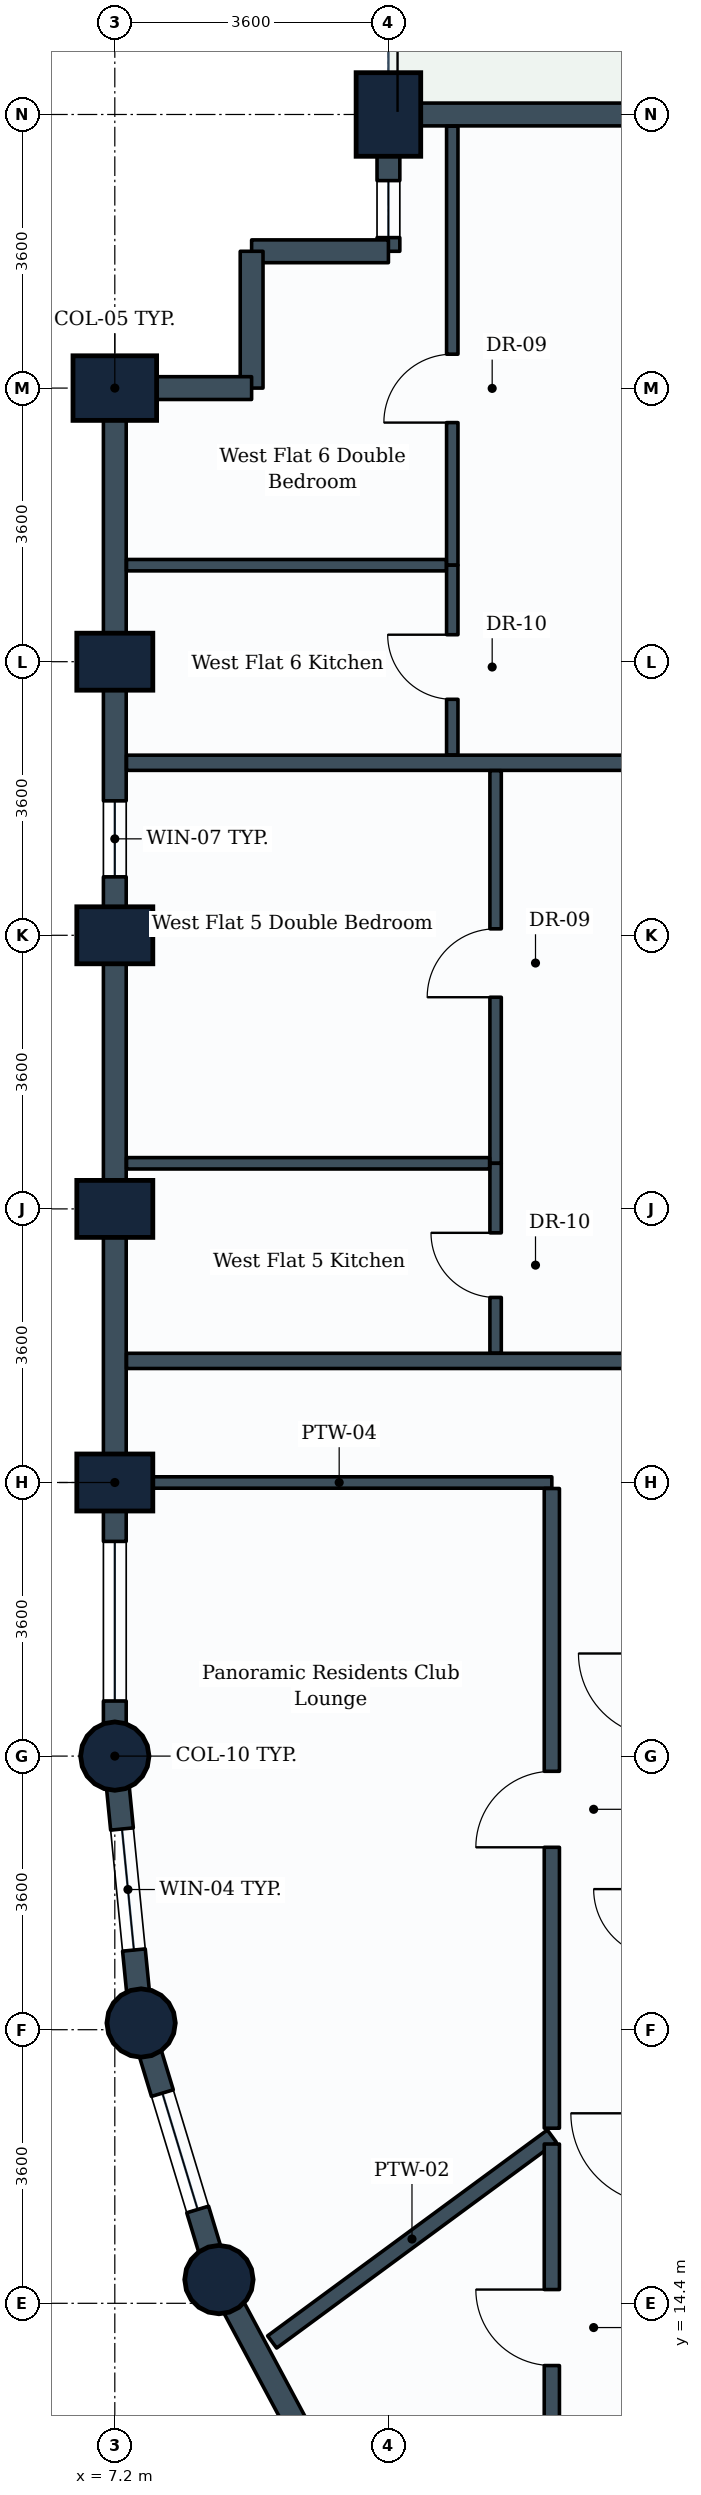
"""IFC4 building model, lengths in metres.
Left out: names, types, materials, properties, quantities, classifications, styles, units other than length and angle.
Written with IfcOpenShell. Run it as: python <this file> out.ifc"""

import sys

from ifc_helpers import new_model, si_unit, direction, frame, frame_2d, origin, origin_2d, place, context, subcontext, project, spatial, rectangle, circle, extrude, element, fill, save


model = new_model("IFC4")
c1 = context("Model", 3, precision=1e-05, world=origin(), true_north=direction((0.0, 1.0)))
c2 = subcontext(c1, "Body", "Model", "MODEL_VIEW")
j1 = project(units=[si_unit("LENGTHUNIT", "METRE"), si_unit("PLANEANGLEUNIT", "RADIAN")], contexts=[c1])
p1 = place(None, origin())
s1 = spatial("IfcSite", under=j1, at=p1, CompositionType="ELEMENT")
p2 = place(p1, origin())
s2 = spatial("IfcBuilding", under=s1, at=p2, CompositionType="ELEMENT")
p3 = place(p2, frame((0.0, 0.0, 131.4)))
s3 = spatial("IfcBuildingStorey", under=s2, at=p3, CompositionType="ELEMENT", Elevation=131.4)
p4 = place(p3, frame((7.2, 21.6, 0.0), z_axis=(0.0, 0.0, 1.0), x_axis=(1.0, 0.0, 0.0)))
e1 = element("IfcColumn", 1, at=p4, inside=s3, PredefinedType="COLUMN", context=c2, shape_type="SweptSolid", body=[
    extrude(circle(Radius=0.45, at=origin_2d()), origin(), (0.0, 0.0, 1.0), 3.8),
])
for number, where, z_axis, x_axis in (
    (2, (7.2, 25.2, 0.0), (0.0, 0.0, 1.0), (0.0, 1.0, 0.0)),
    (3, (7.2, 28.8, 0.0), (0.0, 0.0, 1.0), (0.0, 1.0, 0.0)),
    (4, (7.2, 32.4, 0.0), (0.0, 0.0, 1.0), (0.0, 1.0, 0.0)),
    (5, (7.2, 36.0, 0.0), (0.0, 0.0, 1.0), (0.0, 1.0, 0.0)),
):
    element("IfcColumn", number, at=place(p3, frame(where, z_axis=z_axis, x_axis=x_axis)), inside=s3, PredefinedType="COLUMN", context=c2, shape_type="SweptSolid", body=[
        extrude(rectangle(XDim=0.75, YDim=1.0, at=origin_2d()), origin(), (0.0, 0.0, 1.0), 3.8),
    ])
p5 = place(p3, frame((7.2, 39.6, 0.0), z_axis=(0.0, 0.0, 1.0), x_axis=(0.0, 1.0, 0.0)))
e6 = element("IfcColumn", 6, at=p5, inside=s3, PredefinedType="COLUMN", context=c2, shape_type="SweptSolid", body=[
    extrude(rectangle(XDim=0.85, YDim=1.1, at=origin_2d()), origin(), (0.0, 0.0, 1.0), 3.8),
])
for number, where, z_axis, x_axis in (
    (7, (7.546, 18.088, 0.0), (0.0, 0.0, 1.0), (1.0, 0.0, 0.0)),
    (8, (8.57, 14.712, 0.0), (0.0, 0.0, 1.0), (1.0, 0.0, 0.0)),
):
    element("IfcColumn", number, at=place(p3, frame(where, z_axis=z_axis, x_axis=x_axis)), inside=s3, PredefinedType="COLUMN", context=c2, shape_type="SweptSolid", body=[
        extrude(circle(Radius=0.45, at=origin_2d()), origin(), (0.0, 0.0, 1.0), 3.8),
    ])
p6 = place(p3, frame((10.8, 43.2, 0.0), z_axis=(0.0, 0.0, 1.0), x_axis=(1.0, 0.0, 0.0)))
e9 = element("IfcColumn", 9, at=p6, inside=s3, PredefinedType="COLUMN", context=c2, shape_type="SweptSolid", body=[
    extrude(rectangle(XDim=0.85, YDim=1.1, at=origin_2d()), origin(), (0.0, 0.0, 1.0), 3.8),
])
p7 = place(p3, frame((10.8, 43.2, 0.0), z_axis=(0.0, 0.0, 1.0), x_axis=(1.0, 0.0, 0.0)))
e10 = element("IfcWall", 10, at=p7, inside=s3, PredefinedType="STANDARD", context=c2, shape_type="SweptSolid", body=[
    extrude(rectangle(XDim=3.6, YDim=0.3, at=frame_2d((1.8, 0.0))), origin(), (0.0, 0.0, 1.0), 2.93),
])
p8 = place(p3, frame((10.8, 41.4, 0.0), z_axis=(0.0, 0.0, 1.0), x_axis=(0.0, 1.0, 0.0)))
e11 = element("IfcWall", 11, at=p8, inside=s3, PredefinedType="STANDARD", context=c2, shape_type="SweptSolid", body=[
    extrude(rectangle(XDim=1.8, YDim=0.3, at=frame_2d((0.9, 0.0))), origin(), (0.0, 0.0, 1.0), 2.93),
])
p9 = place(p8, frame((0.18, 0.0, 0.85)))
e12 = element("IfcOpeningElement", 12, at=p9, cuts=e11, PredefinedType="OPENING", context=c2, shape_type="SweptSolid", body=[
    extrude(rectangle(XDim=0.75, YDim=1.05, at=frame_2d((0.375, 0.525))), frame((0.0, 0.16, 0.0), z_axis=(0.0, -1.0, 0.0), x_axis=(1.0, 0.0, 0.0)), (0.0, 0.0, 1.0), 0.32),
])
p10 = place(p3, frame((9.0, 41.4, 0.0), z_axis=(0.0, 0.0, 1.0), x_axis=(1.0, 0.0, 0.0)))
e13 = element("IfcWall", 13, at=p10, inside=s3, PredefinedType="STANDARD", context=c2, shape_type="SweptSolid", body=[
    extrude(rectangle(XDim=1.8, YDim=0.3, at=frame_2d((0.9, 0.0))), origin(), (0.0, 0.0, 1.0), 3.535),
])
p11 = place(p3, frame((9.0, 39.6, 0.0), z_axis=(0.0, 0.0, 1.0), x_axis=(0.0, 1.0, 0.0)))
e14 = element("IfcWall", 14, at=p11, inside=s3, PredefinedType="STANDARD", context=c2, shape_type="SweptSolid", body=[
    extrude(rectangle(XDim=1.8, YDim=0.3, at=frame_2d((0.9, 0.0))), origin(), (0.0, 0.0, 1.0), 3.535),
])
p12 = place(p3, frame((7.2, 39.6, 0.0), z_axis=(0.0, 0.0, 1.0), x_axis=(1.0, 0.0, 0.0)))
e15 = element("IfcWall", 15, at=p12, inside=s3, PredefinedType="STANDARD", context=c2, shape_type="SweptSolid", body=[
    extrude(rectangle(XDim=1.8, YDim=0.3, at=frame_2d((0.9, 0.0))), origin(), (0.0, 0.0, 1.0), 2.93),
])
p13 = place(p3, frame((7.2, 36.0, 0.0), z_axis=(0.0, 0.0, 1.0), x_axis=(0.0, 1.0, 0.0)))
e16 = element("IfcWall", 16, at=p13, inside=s3, PredefinedType="STANDARD", context=c2, shape_type="SweptSolid", body=[
    extrude(rectangle(XDim=3.6, YDim=0.3, at=frame_2d((1.8, 0.0))), origin(), (0.0, 0.0, 1.0), 2.93),
])
p14 = place(p3, frame((7.2, 32.4, 0.0), z_axis=(0.0, 0.0, 1.0), x_axis=(0.0, 1.0, 0.0)))
e17 = element("IfcWall", 17, at=p14, inside=s3, PredefinedType="STANDARD", context=c2, shape_type="SweptSolid", body=[
    extrude(rectangle(XDim=3.6, YDim=0.3, at=frame_2d((1.8, 0.0))), origin(), (0.0, 0.0, 1.0), 2.93),
])
p15 = place(p14, frame((0.769, 0.0, 0.85)))
e18 = element("IfcOpeningElement", 18, at=p15, cuts=e17, PredefinedType="OPENING", context=c2, shape_type="SweptSolid", body=[
    extrude(rectangle(XDim=1.0, YDim=1.35, at=frame_2d((0.5, 0.675))), frame((0.0, 0.16, 0.0), z_axis=(0.0, -1.0, 0.0), x_axis=(1.0, 0.0, 0.0)), (0.0, 0.0, 1.0), 0.32),
])
p16 = place(p3, frame((7.2, 28.8, 0.0), z_axis=(0.0, 0.0, 1.0), x_axis=(0.0, 1.0, 0.0)))
e19 = element("IfcWall", 19, at=p16, inside=s3, PredefinedType="STANDARD", context=c2, shape_type="SweptSolid", body=[
    extrude(rectangle(XDim=3.6, YDim=0.3, at=frame_2d((1.8, 0.0))), origin(), (0.0, 0.0, 1.0), 2.93),
])
p17 = place(p3, frame((7.2, 25.2, 0.0), z_axis=(0.0, 0.0, 1.0), x_axis=(0.0, 1.0, 0.0)))
e20 = element("IfcWall", 20, at=p17, inside=s3, PredefinedType="STANDARD", context=c2, shape_type="SweptSolid", body=[
    extrude(rectangle(XDim=3.6, YDim=0.3, at=frame_2d((1.8, 0.0))), origin(), (0.0, 0.0, 1.0), 2.93),
])
p18 = place(p3, frame((7.2, 21.6, 0.0), z_axis=(0.0, 0.0, 1.0), x_axis=(0.0, 1.0, 0.0)))
e21 = element("IfcWall", 21, at=p18, inside=s3, PredefinedType="STANDARD", context=c2, shape_type="SweptSolid", body=[
    extrude(rectangle(XDim=3.6, YDim=0.3, at=frame_2d((1.8, 0.0))), origin(), (0.0, 0.0, 1.0), 2.93),
])
p19 = place(p18, frame((0.725, 0.0, 0.85)))
e22 = element("IfcOpeningElement", 22, at=p19, cuts=e21, PredefinedType="OPENING", context=c2, shape_type="SweptSolid", body=[
    extrude(rectangle(XDim=2.1, YDim=1.35, at=frame_2d((1.05, 0.675))), frame((0.0, 0.16, 0.0), z_axis=(0.0, -1.0, 0.0), x_axis=(1.0, 0.0, 0.0)), (0.0, 0.0, 1.0), 0.32),
])
p20 = place(p3, frame((7.546, 18.088, 0.0), z_axis=(0.0, 0.0, 1.0), x_axis=(-0.09802417461, 0.995184033831, 0.0)))
e23 = element("IfcWall", 23, at=p20, inside=s3, PredefinedType="STANDARD", context=c2, shape_type="SweptSolid", body=[
    extrude(rectangle(XDim=3.529, YDim=0.3, at=frame_2d((1.765, 0.0))), origin(), (0.0, 0.0, 1.0), 2.93),
])
p21 = place(p20, frame((0.965, 0.0, 0.85)))
e24 = element("IfcOpeningElement", 24, at=p21, cuts=e23, PredefinedType="OPENING", context=c2, shape_type="SweptSolid", body=[
    extrude(rectangle(XDim=1.6, YDim=1.35, at=frame_2d((0.8, 0.675))), frame((0.0, 0.16, 0.0), z_axis=(0.0, -1.0, 0.0), x_axis=(1.0, 0.0, 0.0)), (0.0, 0.0, 1.0), 0.32),
])
p22 = place(p3, frame((8.57, 14.712, 0.0), z_axis=(0.0, 0.0, 1.0), x_axis=(-0.290305086481, 0.956934144423, 0.0)))
e25 = element("IfcWall", 25, at=p22, inside=s3, PredefinedType="STANDARD", context=c2, shape_type="SweptSolid", body=[
    extrude(rectangle(XDim=3.528, YDim=0.3, at=frame_2d((1.764, 0.0))), origin(), (0.0, 0.0, 1.0), 2.93),
])
p23 = place(p22, frame((0.964, 0.0, 0.85)))
e26 = element("IfcOpeningElement", 26, at=p23, cuts=e25, PredefinedType="OPENING", context=c2, shape_type="SweptSolid", body=[
    extrude(rectangle(XDim=1.6, YDim=1.35, at=frame_2d((0.8, 0.675))), frame((0.0, 0.16, 0.0), z_axis=(0.0, -1.0, 0.0), x_axis=(1.0, 0.0, 0.0)), (0.0, 0.0, 1.0), 0.32),
])
p24 = place(p3, frame((10.234, 11.6, 0.0), z_axis=(0.0, 0.0, 1.0), x_axis=(-0.47151087309, 0.881860247748, 0.0)))
e27 = element("IfcWall", 27, at=p24, inside=s3, PredefinedType="STANDARD", context=c2, shape_type="SweptSolid", body=[
    extrude(rectangle(XDim=3.529, YDim=0.3, at=frame_2d((1.764, 0.0))), origin(), (0.0, 0.0, 1.0), 2.93),
])
p25 = place(p3, frame((7.354, 25.2, 0.0), z_axis=(0.0, 0.0, 1.0), x_axis=(1.0, 0.0, 0.0)))
e28 = element("IfcWall", 28, at=p25, inside=s3, PredefinedType="PARTITIONING", context=c2, shape_type="SweptSolid", body=[
    extrude(rectangle(XDim=5.596, YDim=0.15, at=frame_2d((2.798, 0.0))), origin(), (0.0, 0.0, 1.0), 3.535),
])
p26 = place(p3, frame((12.95, 16.6, 0.0), z_axis=(0.0, 0.0, 1.0), x_axis=(-0.805365932827, -0.592777963694, 0.0)))
e29 = element("IfcWall", 29, at=p26, inside=s3, PredefinedType="PARTITIONING", context=c2, shape_type="SweptSolid", body=[
    extrude(rectangle(XDim=4.57, YDim=0.2, at=frame_2d((2.285, 0.0))), origin(), (0.0, 0.0, 1.0), 2.93),
])
p27 = place(p3, frame((12.95, 16.704, 0.0), z_axis=(0.0, 0.0, 1.0), x_axis=(0.0, 1.0, 0.0)))
e30 = element("IfcWall", 30, at=p27, inside=s3, PredefinedType="PARTITIONING", context=c2, shape_type="SweptSolid", body=[
    extrude(rectangle(XDim=8.417, YDim=0.2, at=frame_2d((4.208, 0.0))), origin(), (0.0, 0.0, 1.0), 3.18),
])
p28 = place(p27, frame((3.696, 0.0, 0.0)))
e31 = element("IfcOpeningElement", 31, at=p28, cuts=e30, PredefinedType="OPENING", context=c2, shape_type="SweptSolid", body=[
    extrude(rectangle(XDim=1.0, YDim=2.1, at=frame_2d((0.5, 1.05))), frame((0.0, 0.11, 0.0), z_axis=(0.0, -1.0, 0.0), x_axis=(1.0, 0.0, 0.0)), (0.0, 0.0, 1.0), 0.22),
])
p29 = place(p3, frame((12.95, 9.619, 0.0), z_axis=(0.0, 0.0, 1.0), x_axis=(0.0, 1.0, 0.0)))
e32 = element("IfcWall", 32, at=p29, inside=s3, PredefinedType="PARTITIONING", context=c2, shape_type="SweptSolid", body=[
    extrude(rectangle(XDim=6.877, YDim=0.2, at=frame_2d((3.438, 0.0))), origin(), (0.0, 0.0, 1.0), 3.17),
])
p30 = place(p29, frame((3.962, 0.0, 0.0)))
e33 = element("IfcOpeningElement", 33, at=p30, cuts=e32, PredefinedType="OPENING", context=c2, shape_type="SweptSolid", body=[
    extrude(rectangle(XDim=1.0, YDim=2.1, at=frame_2d((0.5, 1.05))), frame((0.0, 0.11, 0.0), z_axis=(0.0, -1.0, 0.0), x_axis=(1.0, 0.0, 0.0)), (0.0, 0.0, 1.0), 0.22),
])
for number, where, z_axis, x_axis in (
    (34, (7.354, 26.8, 0.0), (0.0, 0.0, 1.0), (1.0, 0.0, 0.0)),
    (35, (7.354, 34.67, 0.0), (0.0, 0.0, 1.0), (1.0, 0.0, 0.0)),
):
    element("IfcWall", number, at=place(p3, frame(where, z_axis=z_axis, x_axis=x_axis)), inside=s3, PredefinedType="PARTITIONING", context=c2, shape_type="SweptSolid", body=[
        extrude(rectangle(XDim=14.046, YDim=0.2, at=frame_2d((7.023, 0.0))), origin(), (0.0, 0.0, 1.0), 2.93),
    ])
p31 = place(p3, frame((12.21, 29.4, 0.0), z_axis=(0.0, 0.0, 1.0), x_axis=(0.0, 1.0, 0.0)))
e36 = element("IfcWall", 36, at=p31, inside=s3, PredefinedType="PARTITIONING", context=c2, shape_type="SweptSolid", body=[
    extrude(rectangle(XDim=5.166, YDim=0.15, at=frame_2d((2.583, 0.0))), origin(), (0.0, 0.0, 1.0), 3.18),
])
p32 = place(p31, frame((2.185, 0.0, 0.0)))
e37 = element("IfcOpeningElement", 37, at=p32, cuts=e36, PredefinedType="OPENING", context=c2, shape_type="SweptSolid", body=[
    extrude(rectangle(XDim=0.9, YDim=2.1, at=frame_2d((0.45, 1.05))), frame((0.0, 0.085, 0.0), z_axis=(0.0, -1.0, 0.0), x_axis=(1.0, 0.0, 0.0)), (0.0, 0.0, 1.0), 0.17),
])
p33 = place(p3, frame((12.21, 26.904, 0.0), z_axis=(0.0, 0.0, 1.0), x_axis=(0.0, 1.0, 0.0)))
e38 = element("IfcWall", 38, at=p33, inside=s3, PredefinedType="PARTITIONING", context=c2, shape_type="SweptSolid", body=[
    extrude(rectangle(XDim=2.496, YDim=0.15, at=frame_2d((1.248, 0.0))), origin(), (0.0, 0.0, 1.0), 3.17),
])
p34 = place(p33, frame((0.731, 0.0, 0.0)))
e39 = element("IfcOpeningElement", 39, at=p34, cuts=e38, PredefinedType="OPENING", context=c2, shape_type="SweptSolid", body=[
    extrude(rectangle(XDim=0.85, YDim=2.1, at=frame_2d((0.425, 1.05))), frame((0.0, 0.085, 0.0), z_axis=(0.0, -1.0, 0.0), x_axis=(1.0, 0.0, 0.0)), (0.0, 0.0, 1.0), 0.17),
])
p35 = place(p3, frame((7.354, 29.4, 0.0), z_axis=(0.0, 0.0, 1.0), x_axis=(1.0, 0.0, 0.0)))
e40 = element("IfcWall", 40, at=p35, inside=s3, PredefinedType="PARTITIONING", context=c2, shape_type="SweptSolid", body=[
    extrude(rectangle(XDim=4.777, YDim=0.15, at=frame_2d((2.389, 0.0))), origin(), (0.0, 0.0, 1.0), 2.93),
])
p36 = place(p3, frame((11.64, 37.27, 0.0), z_axis=(0.0, 0.0, 1.0), x_axis=(0.0, 1.0, 0.0)))
e41 = element("IfcWall", 41, at=p36, inside=s3, PredefinedType="PARTITIONING", context=c2, shape_type="SweptSolid", body=[
    extrude(rectangle(XDim=5.776, YDim=0.15, at=frame_2d((2.888, 0.0))), origin(), (0.0, 0.0, 1.0), 2.93),
])
p37 = place(p36, frame((1.876, 0.0, 0.0)))
e42 = element("IfcOpeningElement", 42, at=p37, cuts=e41, PredefinedType="OPENING", context=c2, shape_type="SweptSolid", body=[
    extrude(rectangle(XDim=0.9, YDim=2.1, at=frame_2d((0.45, 1.05))), frame((0.0, 0.085, 0.0), z_axis=(0.0, -1.0, 0.0), x_axis=(1.0, 0.0, 0.0)), (0.0, 0.0, 1.0), 0.17),
])
p38 = place(p3, frame((11.64, 34.774, 0.0), z_axis=(0.0, 0.0, 1.0), x_axis=(0.0, 1.0, 0.0)))
e43 = element("IfcWall", 43, at=p38, inside=s3, PredefinedType="PARTITIONING", context=c2, shape_type="SweptSolid", body=[
    extrude(rectangle(XDim=2.496, YDim=0.15, at=frame_2d((1.248, 0.0))), origin(), (0.0, 0.0, 1.0), 3.17),
])
p39 = place(p38, frame((0.731, 0.0, 0.0)))
e44 = element("IfcOpeningElement", 44, at=p39, cuts=e43, PredefinedType="OPENING", context=c2, shape_type="SweptSolid", body=[
    extrude(rectangle(XDim=0.85, YDim=2.1, at=frame_2d((0.425, 1.05))), frame((0.0, 0.085, 0.0), z_axis=(0.0, -1.0, 0.0), x_axis=(1.0, 0.0, 0.0)), (0.0, 0.0, 1.0), 0.17),
])
p40 = place(p3, frame((7.354, 37.27, 0.0), z_axis=(0.0, 0.0, 1.0), x_axis=(1.0, 0.0, 0.0)))
e45 = element("IfcWall", 45, at=p40, inside=s3, PredefinedType="PARTITIONING", context=c2, shape_type="SweptSolid", body=[
    extrude(rectangle(XDim=4.207, YDim=0.15, at=frame_2d((2.104, 0.0))), origin(), (0.0, 0.0, 1.0), 2.93),
])
p41 = place(p19, origin())
e46 = element("IfcWindow", 46, at=p41, inside=s3, PartitioningType="SINGLE_PANEL", PredefinedType="WINDOW", context=c2, shape_type="SweptSolid", body=[
    extrude(rectangle(XDim=2.1, YDim=1.35, at=frame_2d((1.05, 0.675))), frame((0.0, 0.03, 0.0), z_axis=(0.0, -1.0, 0.0), x_axis=(1.0, 0.0, 0.0)), (0.0, 0.0, 1.0), 0.06),
])
fill(e22, e46)
p42 = place(p21, origin())
e47 = element("IfcWindow", 47, at=p42, inside=s3, PartitioningType="SINGLE_PANEL", PredefinedType="WINDOW", context=c2, shape_type="SweptSolid", body=[
    extrude(rectangle(XDim=1.6, YDim=1.35, at=frame_2d((0.8, 0.675))), frame((0.0, 0.03, 0.0), z_axis=(0.0, -1.0, 0.0), x_axis=(1.0, 0.0, 0.0)), (0.0, 0.0, 1.0), 0.06),
])
fill(e24, e47)
p43 = place(p23, origin())
e48 = element("IfcWindow", 48, at=p43, inside=s3, PartitioningType="SINGLE_PANEL", PredefinedType="WINDOW", context=c2, shape_type="SweptSolid", body=[
    extrude(rectangle(XDim=1.6, YDim=1.35, at=frame_2d((0.8, 0.675))), frame((0.0, 0.03, 0.0), z_axis=(0.0, -1.0, 0.0), x_axis=(1.0, 0.0, 0.0)), (0.0, 0.0, 1.0), 0.06),
])
fill(e26, e48)
p44 = place(p28, origin())
e49 = element("IfcDoor", 49, at=p44, inside=s3, OperationType="SINGLE_SWING_LEFT", PredefinedType="DOOR", context=c2, shape_type="SweptSolid", body=[
    extrude(rectangle(XDim=1.0, YDim=2.1, at=frame_2d((0.5, 1.05))), frame((0.0, 0.025, 0.0), z_axis=(0.0, -1.0, 0.0), x_axis=(1.0, 0.0, 0.0)), (0.0, 0.0, 1.0), 0.05),
])
fill(e31, e49)
p45 = place(p30, origin())
e50 = element("IfcDoor", 50, at=p45, inside=s3, OperationType="SINGLE_SWING_RIGHT", PredefinedType="DOOR", context=c2, shape_type="SweptSolid", body=[
    extrude(rectangle(XDim=1.0, YDim=2.1, at=frame_2d((0.5, 1.05))), frame((0.0, 0.025, 0.0), z_axis=(0.0, -1.0, 0.0), x_axis=(1.0, 0.0, 0.0)), (0.0, 0.0, 1.0), 0.05),
])
fill(e33, e50)
p46 = place(p32, origin())
e51 = element("IfcDoor", 51, at=p46, inside=s3, OperationType="SINGLE_SWING_LEFT", PredefinedType="DOOR", context=c2, shape_type="SweptSolid", body=[
    extrude(rectangle(XDim=0.9, YDim=2.1, at=frame_2d((0.45, 1.05))), frame((0.0, 0.025, 0.0), z_axis=(0.0, -1.0, 0.0), x_axis=(1.0, 0.0, 0.0)), (0.0, 0.0, 1.0), 0.05),
])
fill(e37, e51)
p47 = place(p34, origin())
e52 = element("IfcDoor", 52, at=p47, inside=s3, OperationType="SINGLE_SWING_RIGHT", PredefinedType="DOOR", context=c2, shape_type="SweptSolid", body=[
    extrude(rectangle(XDim=0.85, YDim=2.1, at=frame_2d((0.425, 1.05))), frame((0.0, 0.025, 0.0), z_axis=(0.0, -1.0, 0.0), x_axis=(1.0, 0.0, 0.0)), (0.0, 0.0, 1.0), 0.05),
])
fill(e39, e52)
p48 = place(p37, origin())
e53 = element("IfcDoor", 53, at=p48, inside=s3, OperationType="SINGLE_SWING_LEFT", PredefinedType="DOOR", context=c2, shape_type="SweptSolid", body=[
    extrude(rectangle(XDim=0.9, YDim=2.1, at=frame_2d((0.45, 1.05))), frame((0.0, 0.025, 0.0), z_axis=(0.0, -1.0, 0.0), x_axis=(1.0, 0.0, 0.0)), (0.0, 0.0, 1.0), 0.05),
])
fill(e42, e53)
p49 = place(p39, origin())
e54 = element("IfcDoor", 54, at=p49, inside=s3, OperationType="SINGLE_SWING_RIGHT", PredefinedType="DOOR", context=c2, shape_type="SweptSolid", body=[
    extrude(rectangle(XDim=0.85, YDim=2.1, at=frame_2d((0.425, 1.05))), frame((0.0, 0.025, 0.0), z_axis=(0.0, -1.0, 0.0), x_axis=(1.0, 0.0, 0.0)), (0.0, 0.0, 1.0), 0.05),
])
fill(e44, e54)
p50 = place(p15, origin())
e55 = element("IfcWindow", 55, at=p50, inside=s3, PartitioningType="SINGLE_PANEL", PredefinedType="WINDOW", context=c2, shape_type="SweptSolid", body=[
    extrude(rectangle(XDim=1.0, YDim=1.35, at=frame_2d((0.5, 0.675))), frame((0.0, 0.03, 0.0), z_axis=(0.0, -1.0, 0.0), x_axis=(1.0, 0.0, 0.0)), (0.0, 0.0, 1.0), 0.06),
])
fill(e18, e55)
p51 = place(p9, origin())
e56 = element("IfcWindow", 56, at=p51, inside=s3, PartitioningType="SINGLE_PANEL", PredefinedType="WINDOW", context=c2, shape_type="SweptSolid", body=[
    extrude(rectangle(XDim=0.75, YDim=1.05, at=frame_2d((0.375, 0.525))), frame((0.0, 0.03, 0.0), z_axis=(0.0, -1.0, 0.0), x_axis=(1.0, 0.0, 0.0)), (0.0, 0.0, 1.0), 0.06),
])
fill(e12, e56)
save(model, sys.argv[1])
